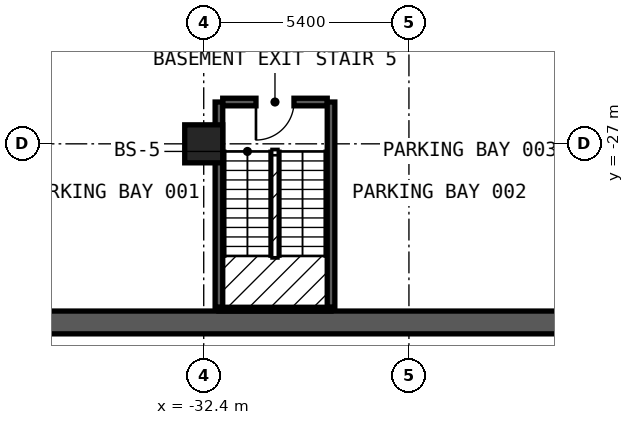
"""IFC4 building model, lengths in metres.
Left out: names, types, materials, properties, quantities, classifications, styles, units other than length and angle.
Written with IfcOpenShell. Run it as: python <this file> out.ifc"""

import sys

from ifc_helpers import new_model, si_unit, direction, frame, frame_2d, origin, origin_2d, place, context, subcontext, project, spatial, rectangle, extrude, element, fill, save


model = new_model("IFC4")
c1 = context("Model", 3, precision=1e-05, world=origin(), true_north=direction((0.0, 1.0)))
c2 = subcontext(c1, "Body", "Model", "MODEL_VIEW")
j1 = project(units=[si_unit("LENGTHUNIT", "METRE"), si_unit("PLANEANGLEUNIT", "RADIAN")], contexts=[c1])
p1 = place(None, origin())
s1 = spatial("IfcSite", under=j1, at=p1, CompositionType="ELEMENT")
p2 = place(p1, origin())
s2 = spatial("IfcBuilding", under=s1, at=p2, CompositionType="ELEMENT")
p3 = place(p2, frame((0.0, 0.0, -4.2)))
s3 = spatial("IfcBuildingStorey", under=s2, at=p3, CompositionType="ELEMENT", Elevation=-4.2)
p4 = place(p3, frame((-48.0, -31.7, 0.0), z_axis=(0.0, 0.0, 1.0), x_axis=(1.0, 0.0, 0.0)))
e1 = element("IfcWall", 1, at=p4, inside=s3, PredefinedType="SOLIDWALL", context=c2, shape_type="SweptSolid", body=[
    extrude(rectangle(XDim=96.0, YDim=0.6, at=frame_2d((48.0, 0.0))), origin(), (0.0, 0.0, 1.0), 4.2),
])
p5 = place(p3, frame((-32.4, -27.0, 0.0), z_axis=(0.0, 0.0, 1.0), x_axis=(1.0, 0.0, 0.0)))
e2 = element("IfcColumn", 2, at=p5, inside=s3, PredefinedType="COLUMN", context=c2, shape_type="SweptSolid", body=[
    extrude(rectangle(XDim=1.0, YDim=1.0, at=origin_2d()), origin(), (0.0, 0.0, 1.0), 4.2),
])
p6 = place(p3, frame((-31.9, -25.9, 0.0), z_axis=(0.0, 0.0, 1.0), x_axis=(1.0, 0.0, 0.0)))
e3 = element("IfcWall", 3, at=p6, inside=s3, PredefinedType="SOLIDWALL", context=c2, shape_type="SweptSolid", body=[
    extrude(rectangle(XDim=2.75, YDim=0.2, at=frame_2d((1.375, 0.0))), origin(), (0.0, 0.0, 1.0), 3.75),
])
p7 = place(p6, frame((1.875, 0.0, 0.0), z_axis=(0.0, 0.0, 1.0), x_axis=(-1.0, 0.0, 0.0)))
e4 = element("IfcOpeningElement", 4, at=p7, cuts=e3, PredefinedType="OPENING", context=c2, shape_type="SweptSolid", body=[
    extrude(rectangle(XDim=1.0, YDim=2.1, at=frame_2d((0.5, 1.05))), frame((0.0, 0.11, 0.0), z_axis=(0.0, -1.0, 0.0), x_axis=(1.0, 0.0, 0.0)), (0.0, 0.0, 1.0), 0.22),
])
for number, where, z_axis, x_axis in (
    (5, (-32.0, -31.3, 0.0), (0.0, 0.0, 1.0), (0.0, 1.0, 0.0)),
    (6, (-29.05, -31.3, 0.0), (0.0, 0.0, 1.0), (0.0, 1.0, 0.0)),
):
    element("IfcWall", number, at=place(p3, frame(where, z_axis=z_axis, x_axis=x_axis)), inside=s3, PredefinedType="SOLIDWALL", context=c2, shape_type="SweptSolid", body=[
        extrude(rectangle(XDim=5.4, YDim=0.2, at=frame_2d((2.7, 0.0))), origin(), (0.0, 0.0, 1.0), 3.75),
    ])
p8 = place(p3, frame((-32.0, -31.35, 0.0), z_axis=(0.0, 0.0, 1.0), x_axis=(1.0, 0.0, 0.0)))
e7 = element("IfcWall", 7, at=p8, inside=s3, PredefinedType="SOLIDWALL", context=c2, shape_type="SweptSolid", body=[
    extrude(rectangle(XDim=2.95, YDim=0.1, at=frame_2d((1.475, 0.0))), origin(), (0.0, 0.0, 1.0), 3.75),
])
p9 = place(p7, origin())
e8 = element("IfcDoor", 8, at=p9, inside=s3, OperationType="SINGLE_SWING_RIGHT", PredefinedType="DOOR", context=c2, shape_type="SweptSolid", body=[
    extrude(rectangle(XDim=1.0, YDim=2.1, at=frame_2d((0.5, 1.05))), frame((0.0, 0.025, 0.0), z_axis=(0.0, -1.0, 0.0), x_axis=(1.0, 0.0, 0.0)), (0.0, 0.0, 1.0), 0.05),
])
fill(e4, e8)
save(model, sys.argv[1])
